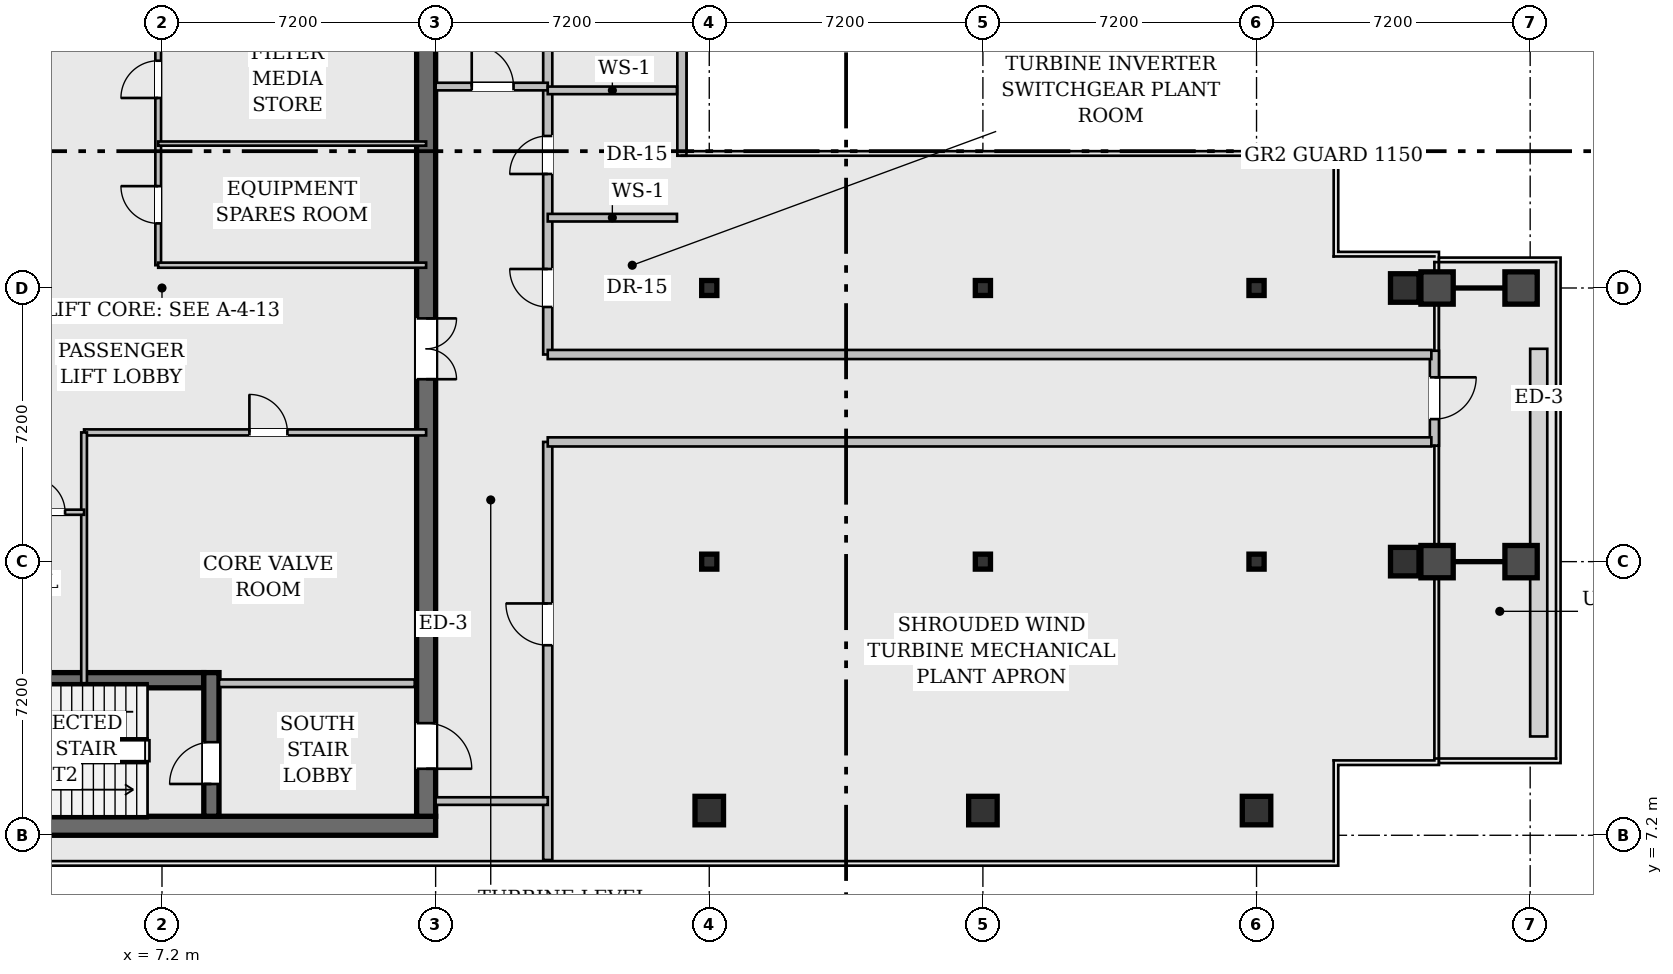
"""IFC4 building model, lengths in metres.
Left out: names, types, materials, properties, quantities, classifications, styles, units other than length and angle.
Written with IfcOpenShell. Run it as: python <this file> out.ifc"""

import sys

from ifc_helpers import new_model, si_unit, direction, frame, frame_2d, origin, origin_2d, place, context, subcontext, project, spatial, rectangle, hollow_rectangle, i_section, extrude, element, fill, save


model = new_model("IFC4")
c1 = context("Model", 3, precision=1e-05, world=origin(), true_north=direction((0.0, 1.0)))
c2 = subcontext(c1, "Body", "Model", "MODEL_VIEW")
j1 = project(units=[si_unit("LENGTHUNIT", "METRE"), si_unit("PLANEANGLEUNIT", "RADIAN")], contexts=[c1])
p1 = place(None, origin())
s1 = spatial("IfcSite", under=j1, at=p1, CompositionType="ELEMENT")
p2 = place(p1, origin())
s2 = spatial("IfcBuilding", under=s1, at=p2, CompositionType="ELEMENT")
p3 = place(p2, frame((0.0, 0.0, 232.75)))
s3 = spatial("IfcBuildingStorey", under=s2, at=p3, CompositionType="ELEMENT", Elevation=232.75)
p4 = place(p3, frame((0.5, 7.45, 0.0), z_axis=(0.0, 0.0, 1.0), x_axis=(1.0, 0.0, 0.0)))
e1 = element("IfcWall", 1, at=p4, inside=s3, PredefinedType="SHEAR", context=c2, shape_type="SweptSolid", body=[
    extrude(rectangle(XDim=13.9, YDim=0.5, at=frame_2d((6.95, 0.0))), origin(), (0.0, 0.0, 1.0), 3.94),
])
p5 = place(p3, frame((14.15, 35.5, 0.0), z_axis=(0.0, 0.0, 1.0), x_axis=(0.0, -1.0, 0.0)))
e2 = element("IfcWall", 2, at=p5, inside=s3, PredefinedType="SHEAR", context=c2, shape_type="SweptSolid", body=[
    extrude(rectangle(XDim=27.8, YDim=0.5, at=frame_2d((13.9, 0.0))), origin(), (0.0, 0.0, 1.0), 3.94),
])
p6 = place(p5, frame((1.4, 0.0, 0.0)))
e3 = element("IfcOpeningElement", 3, at=p6, cuts=e2, PredefinedType="OPENING", context=c2, shape_type="SweptSolid", body=[
    extrude(rectangle(XDim=1.2, YDim=2.15, at=frame_2d((0.6, 1.075))), frame((0.0, 0.262, 0.0), z_axis=(0.0, -1.0, 0.0), x_axis=(1.0, 0.0, 0.0)), (0.0, 0.0, 1.0), 0.524),
])
p7 = place(p5, frame((25.35, 0.0, 0.0)))
e4 = element("IfcOpeningElement", 4, at=p7, cuts=e2, PredefinedType="OPENING", context=c2, shape_type="SweptSolid", body=[
    extrude(rectangle(XDim=1.2, YDim=2.15, at=frame_2d((0.6, 1.075))), frame((0.0, 0.262, 0.0), z_axis=(0.0, -1.0, 0.0), x_axis=(1.0, 0.0, 0.0)), (0.0, 0.0, 1.0), 0.524),
])
p8 = place(p5, frame((14.7, 0.0, 0.0)))
e5 = element("IfcOpeningElement", 5, at=p8, cuts=e2, PredefinedType="OPENING", context=c2, shape_type="SweptSolid", body=[
    extrude(rectangle(XDim=1.6, YDim=2.2, at=frame_2d((0.8, 1.1))), frame((0.0, 0.262, 0.0), z_axis=(0.0, -1.0, 0.0), x_axis=(1.0, 0.0, 0.0)), (0.0, 0.0, 1.0), 0.524),
])
p9 = place(p3, frame((0.5, 11.28, 0.0), z_axis=(0.0, 0.0, 1.0), x_axis=(1.0, 0.0, 0.0)))
e6 = element("IfcWall", 6, at=p9, inside=s3, PredefinedType="SHEAR", context=c2, shape_type="SweptSolid", body=[
    extrude(rectangle(XDim=7.8, YDim=0.4, at=frame_2d((3.9, 0.0))), origin(), (0.0, 0.0, 1.0), 3.94),
])
p10 = place(p3, frame((8.5, 7.7, 0.0), z_axis=(0.0, 0.0, 1.0), x_axis=(0.0, 1.0, 0.0)))
e7 = element("IfcWall", 7, at=p10, inside=s3, PredefinedType="SHEAR", context=c2, shape_type="SweptSolid", body=[
    extrude(rectangle(XDim=3.78, YDim=0.4, at=frame_2d((1.89, 0.0))), origin(), (0.0, 0.0, 1.0), 3.94),
])
p11 = place(p10, frame((0.85, 0.0, 0.0)))
e8 = element("IfcOpeningElement", 8, at=p11, cuts=e7, PredefinedType="OPENING", context=c2, shape_type="SweptSolid", body=[
    extrude(rectangle(XDim=1.1, YDim=2.15, at=frame_2d((0.55, 1.075))), frame((0.0, 0.212, 0.0), z_axis=(0.0, -1.0, 0.0), x_axis=(1.0, 0.0, 0.0)), (0.0, 0.0, 1.0), 0.424),
])
p12 = place(p3, frame((21.6, 7.85, 0.0), z_axis=(0.0, 0.0, 1.0), x_axis=(1.0, 0.0, 0.0)))
e9 = element("IfcColumn", 9, at=p12, inside=s3, PredefinedType="COLUMN", context=c2, shape_type="SweptSolid", body=[
    extrude(hollow_rectangle(XDim=0.75, YDim=0.75, WallThickness=0.045, at=origin_2d()), origin(), (0.0, 0.0, 1.0), 3.94),
])
for number, where, z_axis, x_axis in (
    (10, (21.6, 14.4, 0.0), (0.0, 0.0, 1.0), (1.0, 0.0, 0.0)),
    (11, (21.6, 21.6, 0.0), (0.0, 0.0, 1.0), (1.0, 0.0, 0.0)),
):
    element("IfcColumn", number, at=place(p3, frame(where, z_axis=z_axis, x_axis=x_axis)), inside=s3, PredefinedType="COLUMN", context=c2, shape_type="SweptSolid", body=[
        extrude(i_section(OverallWidth=0.399, OverallDepth=0.394, WebThickness=0.023, FlangeThickness=0.037, FilletRadius=0.018, at=origin_2d()), origin(), (0.0, 0.0, 1.0), 3.94),
    ])
p13 = place(p3, frame((28.8, 7.85, 0.0), z_axis=(0.0, 0.0, 1.0), x_axis=(1.0, 0.0, 0.0)))
e12 = element("IfcColumn", 12, at=p13, inside=s3, PredefinedType="COLUMN", context=c2, shape_type="SweptSolid", body=[
    extrude(hollow_rectangle(XDim=0.75, YDim=0.75, WallThickness=0.045, at=origin_2d()), origin(), (0.0, 0.0, 1.0), 3.94),
])
for number, where, z_axis, x_axis in (
    (13, (28.8, 14.4, 0.0), (0.0, 0.0, 1.0), (1.0, 0.0, 0.0)),
    (14, (28.8, 21.6, 0.0), (0.0, 0.0, 1.0), (1.0, 0.0, 0.0)),
):
    element("IfcColumn", number, at=place(p3, frame(where, z_axis=z_axis, x_axis=x_axis)), inside=s3, PredefinedType="COLUMN", context=c2, shape_type="SweptSolid", body=[
        extrude(i_section(OverallWidth=0.399, OverallDepth=0.394, WebThickness=0.023, FlangeThickness=0.037, FilletRadius=0.018, at=origin_2d()), origin(), (0.0, 0.0, 1.0), 3.94),
    ])
p14 = place(p3, frame((36.0, 7.85, 0.0), z_axis=(0.0, 0.0, 1.0), x_axis=(1.0, 0.0, 0.0)))
e15 = element("IfcColumn", 15, at=p14, inside=s3, PredefinedType="COLUMN", context=c2, shape_type="SweptSolid", body=[
    extrude(hollow_rectangle(XDim=0.75, YDim=0.75, WallThickness=0.045, at=origin_2d()), origin(), (0.0, 0.0, 1.0), 3.94),
])
for number, where, z_axis, x_axis in (
    (16, (36.0, 14.4, 0.0), (0.0, 0.0, 1.0), (1.0, 0.0, 0.0)),
    (17, (36.0, 21.6, 0.0), (0.0, 0.0, 1.0), (1.0, 0.0, 0.0)),
):
    element("IfcColumn", number, at=place(p3, frame(where, z_axis=z_axis, x_axis=x_axis)), inside=s3, PredefinedType="COLUMN", context=c2, shape_type="SweptSolid", body=[
        extrude(i_section(OverallWidth=0.399, OverallDepth=0.394, WebThickness=0.023, FlangeThickness=0.037, FilletRadius=0.018, at=origin_2d()), origin(), (0.0, 0.0, 1.0), 3.94),
    ])
for number, where, z_axis, x_axis in (
    (18, (39.9, 14.4, 0.0), (0.0, 0.0, 1.0), (1.0, 0.0, 0.0)),
    (19, (39.9, 21.6, 0.0), (0.0, 0.0, 1.0), (1.0, 0.0, 0.0)),
):
    element("IfcColumn", number, at=place(p3, frame(where, z_axis=z_axis, x_axis=x_axis)), inside=s3, PredefinedType="COLUMN", context=c2, shape_type="SweptSolid", body=[
        extrude(hollow_rectangle(XDim=0.75, YDim=0.75, WallThickness=0.045, at=origin_2d()), origin(), (0.0, 0.0, 1.0), 3.94),
    ])
for number, where, z_axis, x_axis in (
    (20, (40.75, 14.4, -0.26), (0.466, 0.0, 0.885), (0.0, 1.0, 0.0)),
    (21, (40.75, 21.6, -0.26), (0.466, 0.0, 0.885), (0.0, 1.0, 0.0)),
):
    element("IfcColumn", number, at=place(p3, frame(where, z_axis=z_axis, x_axis=x_axis)), inside=s3, PredefinedType="COLUMN", context=c2, shape_type="SweptSolid", body=[
        extrude(hollow_rectangle(XDim=0.85, YDim=0.85, WallThickness=0.055, at=origin_2d()), origin(), (0.0, 0.0, 1.0), 4.746),
    ])
p15 = place(p3, frame((20.88, 37.23, 0.0), z_axis=(0.0, 0.0, 1.0), x_axis=(0.0, -1.0, 0.0)))
e22 = element("IfcWall", 22, at=p15, inside=s3, PredefinedType="STANDARD", context=c2, shape_type="SweptSolid", body=[
    extrude(rectangle(XDim=12.15, YDim=0.24, at=frame_2d((6.075, 0.0))), origin(), (0.0, 0.0, 1.0), 3.94),
])
p16 = place(p3, frame((40.68, 19.95, 0.0), z_axis=(0.0, 0.0, 1.0), x_axis=(0.0, -1.0, 0.0)))
e23 = element("IfcWall", 23, at=p16, inside=s3, PredefinedType="STANDARD", context=c2, shape_type="SweptSolid", body=[
    extrude(rectangle(XDim=2.5, YDim=0.24, at=frame_2d((1.25, 0.0))), origin(), (0.0, 0.0, 1.0), 3.94),
])
p17 = place(p16, frame((0.7, 0.0, 0.0)))
e24 = element("IfcOpeningElement", 24, at=p17, cuts=e23, PredefinedType="OPENING", context=c2, shape_type="SweptSolid", body=[
    extrude(rectangle(XDim=1.1, YDim=2.15, at=frame_2d((0.55, 1.075))), frame((0.0, 0.132, 0.0), z_axis=(0.0, -1.0, 0.0), x_axis=(1.0, 0.0, 0.0)), (0.0, 0.0, 1.0), 0.264),
])
p18 = place(p3, frame((8.7, 11.2, 0.0), z_axis=(0.0, 0.0, 1.0), x_axis=(1.0, 0.0, 0.0)))
e25 = element("IfcWall", 25, at=p18, inside=s3, PredefinedType="PARTITIONING", context=c2, shape_type="SweptSolid", body=[
    extrude(rectangle(XDim=5.15, YDim=0.2, at=frame_2d((2.575, 0.0))), origin(), (0.0, 0.0, 1.0), 3.94),
])
p19 = place(p3, frame((7.1, 22.2, 0.0), z_axis=(0.0, 0.0, 1.0), x_axis=(0.0, 1.0, 0.0)))
e26 = element("IfcWall", 26, at=p19, inside=s3, PredefinedType="PARTITIONING", context=c2, shape_type="SweptSolid", body=[
    extrude(rectangle(XDim=6.58, YDim=0.15, at=frame_2d((3.29, 0.0))), origin(), (0.0, 0.0, 1.0), 3.94),
])
p20 = place(p19, frame((1.1, 0.0, 0.0)))
e27 = element("IfcOpeningElement", 27, at=p20, cuts=e26, PredefinedType="OPENING", context=c2, shape_type="SweptSolid", body=[
    extrude(rectangle(XDim=0.98, YDim=2.15, at=frame_2d((0.49, 1.075))), frame((0.0, 0.087, 0.0), z_axis=(0.0, -1.0, 0.0), x_axis=(1.0, 0.0, 0.0)), (0.0, 0.0, 1.0), 0.174),
])
p21 = place(p19, frame((4.4, 0.0, 0.0)))
e28 = element("IfcOpeningElement", 28, at=p21, cuts=e26, PredefinedType="OPENING", context=c2, shape_type="SweptSolid", body=[
    extrude(rectangle(XDim=0.98, YDim=2.15, at=frame_2d((0.49, 1.075))), frame((0.0, 0.087, 0.0), z_axis=(0.0, -1.0, 0.0), x_axis=(1.0, 0.0, 0.0)), (0.0, 0.0, 1.0), 0.174),
])
p22 = place(p3, frame((7.1, 22.2, 0.0), z_axis=(0.0, 0.0, 1.0), x_axis=(1.0, 0.0, 0.0)))
e29 = element("IfcWall", 29, at=p22, inside=s3, PredefinedType="PARTITIONING", context=c2, shape_type="SweptSolid", body=[
    extrude(rectangle(XDim=7.05, YDim=0.135, at=frame_2d((3.525, 0.0))), origin(), (0.0, 0.0, 1.0), 3.94),
])
p23 = place(p3, frame((7.1, 25.4, 0.0), z_axis=(0.0, 0.0, 1.0), x_axis=(1.0, 0.0, 0.0)))
e30 = element("IfcWall", 30, at=p23, inside=s3, PredefinedType="PARTITIONING", context=c2, shape_type="SweptSolid", body=[
    extrude(rectangle(XDim=7.05, YDim=0.11, at=frame_2d((3.525, 0.0))), origin(), (0.0, 0.0, 1.0), 3.94),
])
p24 = place(p3, frame((5.15, 17.8, 0.0), z_axis=(0.0, 0.0, 1.0), x_axis=(1.0, 0.0, 0.0)))
e31 = element("IfcWall", 31, at=p24, inside=s3, PredefinedType="PARTITIONING", context=c2, shape_type="SweptSolid", body=[
    extrude(rectangle(XDim=9.0, YDim=0.16, at=frame_2d((4.5, 0.0))), origin(), (0.0, 0.0, 1.0), 3.94),
])
p25 = place(p24, frame((4.35, 0.0, 0.0)))
e32 = element("IfcOpeningElement", 32, at=p25, cuts=e31, PredefinedType="OPENING", context=c2, shape_type="SweptSolid", body=[
    extrude(rectangle(XDim=1.0, YDim=2.15, at=frame_2d((0.5, 1.075))), frame((0.0, 0.092, 0.0), z_axis=(0.0, -1.0, 0.0), x_axis=(1.0, 0.0, 0.0)), (0.0, 0.0, 1.0), 0.184),
])
p26 = place(p3, frame((5.15, 11.2, 0.0), z_axis=(0.0, 0.0, 1.0), x_axis=(0.0, 1.0, 0.0)))
e33 = element("IfcWall", 33, at=p26, inside=s3, PredefinedType="PARTITIONING", context=c2, shape_type="SweptSolid", body=[
    extrude(rectangle(XDim=6.6, YDim=0.15, at=frame_2d((3.3, 0.0))), origin(), (0.0, 0.0, 1.0), 3.94),
])
p27 = place(p3, frame((0.6, 15.7, 0.0), z_axis=(0.0, 0.0, 1.0), x_axis=(1.0, 0.0, 0.0)))
e34 = element("IfcWall", 34, at=p27, inside=s3, PredefinedType="PARTITIONING", context=c2, shape_type="SweptSolid", body=[
    extrude(rectangle(XDim=4.55, YDim=0.135, at=frame_2d((2.275, 0.0))), origin(), (0.0, 0.0, 1.0), 3.94),
])
p28 = place(p27, frame((3.15, 0.0, 0.0)))
e35 = element("IfcOpeningElement", 35, at=p28, cuts=e34, PredefinedType="OPENING", context=c2, shape_type="SweptSolid", body=[
    extrude(rectangle(XDim=0.9, YDim=2.15, at=frame_2d((0.45, 1.075))), frame((0.0, 0.08, 0.0), z_axis=(0.0, -1.0, 0.0), x_axis=(1.0, 0.0, 0.0)), (0.0, 0.0, 1.0), 0.159),
])
p29 = place(p3, frame((17.35, 6.55, 0.0), z_axis=(0.0, 0.0, 1.0), x_axis=(0.0, 1.0, 0.0)))
e36 = element("IfcWall", 36, at=p29, inside=s3, PredefinedType="STANDARD", context=c2, shape_type="SweptSolid", body=[
    extrude(rectangle(XDim=11.0, YDim=0.24, at=frame_2d((5.5, 0.0))), origin(), (0.0, 0.0, 1.0), 3.313),
])
p30 = place(p29, frame((5.65, 0.0, 0.0)))
e37 = element("IfcOpeningElement", 37, at=p30, cuts=e36, PredefinedType="OPENING", context=c2, shape_type="SweptSolid", body=[
    extrude(rectangle(XDim=1.1, YDim=2.15, at=frame_2d((0.55, 1.075))), frame((0.0, 0.132, 0.0), z_axis=(0.0, -1.0, 0.0), x_axis=(1.0, 0.0, 0.0)), (0.0, 0.0, 1.0), 0.264),
])
p31 = place(p3, frame((17.35, 19.85, 0.0), z_axis=(0.0, 0.0, 1.0), x_axis=(0.0, 1.0, 0.0)))
e38 = element("IfcWall", 38, at=p31, inside=s3, PredefinedType="STANDARD", context=c2, shape_type="SweptSolid", body=[
    extrude(rectangle(XDim=19.9, YDim=0.24, at=frame_2d((9.95, 0.0))), origin(), (0.0, 0.0, 1.0), 3.313),
])
p32 = place(p31, frame((1.25, 0.0, 0.0)))
e39 = element("IfcOpeningElement", 39, at=p32, cuts=e38, PredefinedType="OPENING", context=c2, shape_type="SweptSolid", body=[
    extrude(rectangle(XDim=1.0, YDim=2.15, at=frame_2d((0.5, 1.075))), frame((0.0, 0.132, 0.0), z_axis=(0.0, -1.0, 0.0), x_axis=(1.0, 0.0, 0.0)), (0.0, 0.0, 1.0), 0.264),
])
p33 = place(p31, frame((4.75, 0.0, 0.0)))
e40 = element("IfcOpeningElement", 40, at=p33, cuts=e38, PredefinedType="OPENING", context=c2, shape_type="SweptSolid", body=[
    extrude(rectangle(XDim=1.0, YDim=2.15, at=frame_2d((0.5, 1.075))), frame((0.0, 0.132, 0.0), z_axis=(0.0, -1.0, 0.0), x_axis=(1.0, 0.0, 0.0)), (0.0, 0.0, 1.0), 0.264),
])
for number, where, z_axis, x_axis in (
    (41, (17.35, 17.55, 0.0), (0.0, 0.0, 1.0), (1.0, 0.0, 0.0)),
    (42, (17.35, 19.85, 0.0), (0.0, 0.0, 1.0), (1.0, 0.0, 0.0)),
):
    element("IfcWall", number, at=place(p3, frame(where, z_axis=z_axis, x_axis=x_axis)), inside=s3, PredefinedType="STANDARD", context=c2, shape_type="SweptSolid", body=[
        extrude(rectangle(XDim=23.25, YDim=0.24, at=frame_2d((11.625, 0.0))), origin(), (0.0, 0.0, 1.0), 3.313),
    ])
p34 = place(p3, frame((14.4, 26.9, 0.0), z_axis=(0.0, 0.0, 1.0), x_axis=(1.0, 0.0, 0.0)))
e43 = element("IfcWall", 43, at=p34, inside=s3, PredefinedType="PARTITIONING", context=c2, shape_type="SweptSolid", body=[
    extrude(rectangle(XDim=2.95, YDim=0.2, at=frame_2d((1.475, 0.0))), origin(), (0.0, 0.0, 1.0), 3.508),
])
p35 = place(p34, frame((0.95, 0.0, 0.0)))
e44 = element("IfcOpeningElement", 44, at=p35, cuts=e43, PredefinedType="OPENING", context=c2, shape_type="SweptSolid", body=[
    extrude(rectangle(XDim=1.1, YDim=2.15, at=frame_2d((0.55, 1.075))), frame((0.0, 0.112, 0.0), z_axis=(0.0, -1.0, 0.0), x_axis=(1.0, 0.0, 0.0)), (0.0, 0.0, 1.0), 0.224),
])
p36 = place(p3, frame((17.35, 23.45, 0.0), z_axis=(0.0, 0.0, 1.0), x_axis=(1.0, 0.0, 0.0)))
e45 = element("IfcWall", 45, at=p36, inside=s3, PredefinedType="PARTITIONING", context=c2, shape_type="SweptSolid", body=[
    extrude(rectangle(XDim=3.4, YDim=0.2, at=frame_2d((1.7, 0.0))), origin(), (0.0, 0.0, 1.0), 3.508),
])
p37 = place(p3, frame((14.4, 8.1, 0.0), z_axis=(0.0, 0.0, 1.0), x_axis=(1.0, 0.0, 0.0)))
e46 = element("IfcWall", 46, at=p37, inside=s3, PredefinedType="PARTITIONING", context=c2, shape_type="SweptSolid", body=[
    extrude(rectangle(XDim=2.95, YDim=0.2, at=frame_2d((1.475, 0.0))), origin(), (0.0, 0.0, 1.0), 3.94),
])
p38 = place(p3, frame((17.35, 26.8, 0.0), z_axis=(0.0, 0.0, 1.0), x_axis=(1.0, 0.0, 0.0)))
e47 = element("IfcWall", 47, at=p38, inside=s3, PredefinedType="PARTITIONING", context=c2, shape_type="SweptSolid", body=[
    extrude(rectangle(XDim=3.4, YDim=0.2, at=frame_2d((1.7, 0.0))), origin(), (0.0, 0.0, 1.0), 3.508),
])
p39 = place(p17, origin())
e48 = element("IfcDoor", 48, at=p39, inside=s3, OperationType="SINGLE_SWING_LEFT", PredefinedType="DOOR", context=c2, shape_type="SweptSolid", body=[
    extrude(rectangle(XDim=1.1, YDim=2.15, at=frame_2d((0.55, 1.075))), frame((0.0, 0.025, 0.0), z_axis=(0.0, -1.0, 0.0), x_axis=(1.0, 0.0, 0.0)), (0.0, 0.0, 1.0), 0.05),
])
fill(e24, e48)
p40 = place(p11, origin())
e49 = element("IfcDoor", 49, at=p40, inside=s3, OperationType="SINGLE_SWING_LEFT", PredefinedType="DOOR", context=c2, shape_type="SweptSolid", body=[
    extrude(rectangle(XDim=1.1, YDim=2.15, at=frame_2d((0.55, 1.075))), frame((0.0, 0.025, 0.0), z_axis=(0.0, -1.0, 0.0), x_axis=(1.0, 0.0, 0.0)), (0.0, 0.0, 1.0), 0.05),
])
fill(e8, e49)
p41 = place(p7, origin())
e50 = element("IfcDoor", 50, at=p41, inside=s3, OperationType="SINGLE_SWING_RIGHT", PredefinedType="DOOR", context=c2, shape_type="SweptSolid", body=[
    extrude(rectangle(XDim=1.2, YDim=2.15, at=frame_2d((0.6, 1.075))), frame((0.0, 0.025, 0.0), z_axis=(0.0, -1.0, 0.0), x_axis=(1.0, 0.0, 0.0)), (0.0, 0.0, 1.0), 0.05),
])
fill(e4, e50)
p42 = place(p8, origin())
e51 = element("IfcDoor", 51, at=p42, inside=s3, OperationType="DOUBLE_DOOR_SINGLE_SWING", PredefinedType="DOOR", context=c2, shape_type="SweptSolid", body=[
    extrude(rectangle(XDim=1.6, YDim=2.2, at=frame_2d((0.8, 1.1))), frame((0.0, 0.025, 0.0), z_axis=(0.0, -1.0, 0.0), x_axis=(1.0, 0.0, 0.0)), (0.0, 0.0, 1.0), 0.05),
])
fill(e5, e51)
p43 = place(p20, origin())
e52 = element("IfcDoor", 52, at=p43, inside=s3, OperationType="SINGLE_SWING_RIGHT", PredefinedType="DOOR", context=c2, shape_type="SweptSolid", body=[
    extrude(rectangle(XDim=0.98, YDim=2.15, at=frame_2d((0.49, 1.075))), frame((0.0, 0.025, 0.0), z_axis=(0.0, -1.0, 0.0), x_axis=(1.0, 0.0, 0.0)), (0.0, 0.0, 1.0), 0.05),
])
fill(e27, e52)
p44 = place(p21, origin())
e53 = element("IfcDoor", 53, at=p44, inside=s3, OperationType="SINGLE_SWING_LEFT", PredefinedType="DOOR", context=c2, shape_type="SweptSolid", body=[
    extrude(rectangle(XDim=0.98, YDim=2.15, at=frame_2d((0.49, 1.075))), frame((0.0, 0.025, 0.0), z_axis=(0.0, -1.0, 0.0), x_axis=(1.0, 0.0, 0.0)), (0.0, 0.0, 1.0), 0.05),
])
fill(e28, e53)
p45 = place(p25, origin())
e54 = element("IfcDoor", 54, at=p45, inside=s3, OperationType="SINGLE_SWING_LEFT", PredefinedType="DOOR", context=c2, shape_type="SweptSolid", body=[
    extrude(rectangle(XDim=1.0, YDim=2.15, at=frame_2d((0.5, 1.075))), frame((0.0, 0.025, 0.0), z_axis=(0.0, -1.0, 0.0), x_axis=(1.0, 0.0, 0.0)), (0.0, 0.0, 1.0), 0.05),
])
fill(e32, e54)
p46 = place(p28, origin())
e55 = element("IfcDoor", 55, at=p46, inside=s3, OperationType="SINGLE_SWING_LEFT", PredefinedType="DOOR", context=c2, shape_type="SweptSolid", body=[
    extrude(rectangle(XDim=0.9, YDim=2.15, at=frame_2d((0.45, 1.075))), frame((0.0, 0.025, 0.0), z_axis=(0.0, -1.0, 0.0), x_axis=(1.0, 0.0, 0.0)), (0.0, 0.0, 1.0), 0.05),
])
fill(e35, e55)
p47 = place(p35, origin())
e56 = element("IfcDoor", 56, at=p47, inside=s3, OperationType="SINGLE_SWING_LEFT", PredefinedType="DOOR", context=c2, shape_type="SweptSolid", body=[
    extrude(rectangle(XDim=1.1, YDim=2.15, at=frame_2d((0.55, 1.075))), frame((0.0, 0.025, 0.0), z_axis=(0.0, -1.0, 0.0), x_axis=(1.0, 0.0, 0.0)), (0.0, 0.0, 1.0), 0.05),
])
fill(e44, e56)
p48 = place(p32, origin())
e57 = element("IfcDoor", 57, at=p48, inside=s3, OperationType="SINGLE_SWING_RIGHT", PredefinedType="DOOR", context=c2, shape_type="SweptSolid", body=[
    extrude(rectangle(XDim=1.0, YDim=2.15, at=frame_2d((0.5, 1.075))), frame((0.0, 0.025, 0.0), z_axis=(0.0, -1.0, 0.0), x_axis=(1.0, 0.0, 0.0)), (0.0, 0.0, 1.0), 0.05),
])
fill(e39, e57)
p49 = place(p33, origin())
e58 = element("IfcDoor", 58, at=p49, inside=s3, OperationType="SINGLE_SWING_LEFT", PredefinedType="DOOR", context=c2, shape_type="SweptSolid", body=[
    extrude(rectangle(XDim=1.0, YDim=2.15, at=frame_2d((0.5, 1.075))), frame((0.0, 0.025, 0.0), z_axis=(0.0, -1.0, 0.0), x_axis=(1.0, 0.0, 0.0)), (0.0, 0.0, 1.0), 0.05),
])
fill(e40, e58)
p50 = place(p30, origin())
e59 = element("IfcDoor", 59, at=p50, inside=s3, OperationType="SINGLE_SWING_RIGHT", PredefinedType="DOOR", context=c2, shape_type="SweptSolid", body=[
    extrude(rectangle(XDim=1.1, YDim=2.15, at=frame_2d((0.55, 1.075))), frame((0.0, 0.025, 0.0), z_axis=(0.0, -1.0, 0.0), x_axis=(1.0, 0.0, 0.0)), (0.0, 0.0, 1.0), 0.05),
])
fill(e37, e59)
save(model, sys.argv[1])
